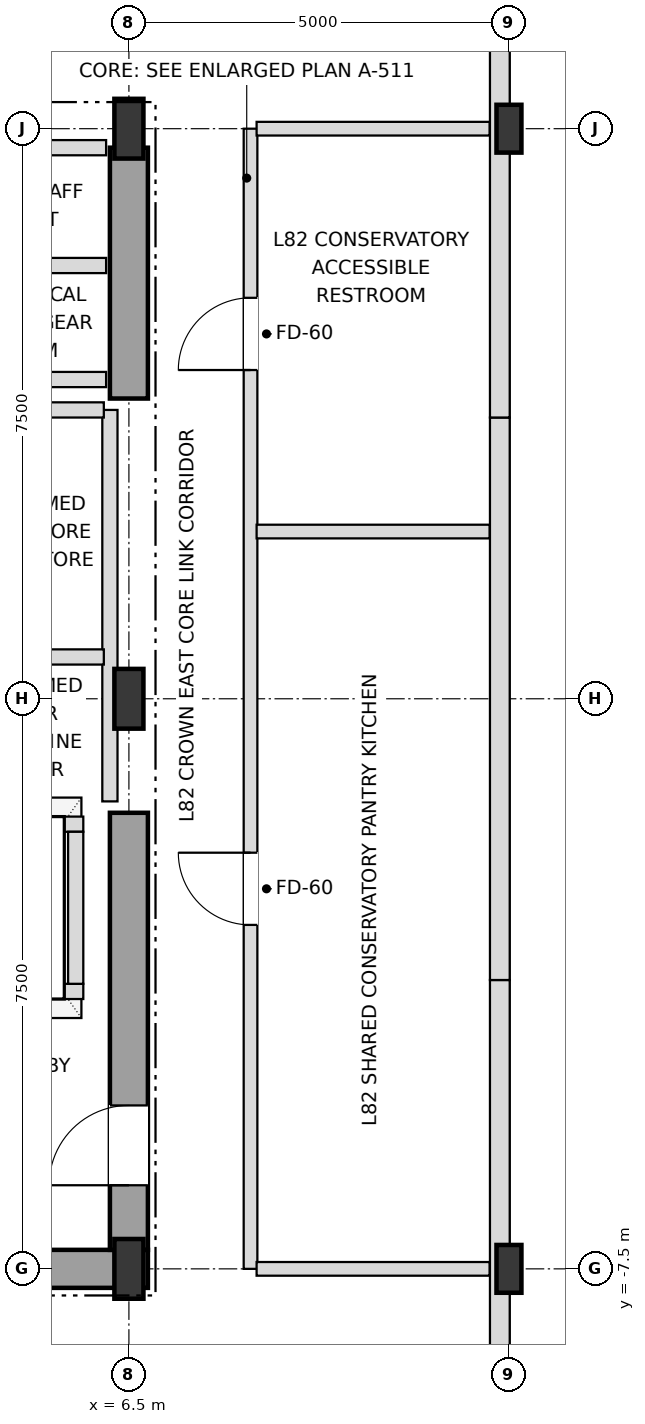
"""IFC4 building model, lengths in metres.
Left out: names, types, materials, properties, quantities, classifications, styles, units other than length and angle.
Written with IfcOpenShell. Run it as: python <this file> out.ifc"""

import sys

from ifc_helpers import new_model, si_unit, direction, frame, frame_2d, origin, origin_2d, place, context, subcontext, project, spatial, rectangle, i_section, extrude, element, fill, save


model = new_model("IFC4")
c1 = context("Model", 3, precision=1e-05, world=origin(), true_north=direction((0.0, 1.0)))
c2 = subcontext(c1, "Body", "Model", "MODEL_VIEW")
j1 = project(units=[si_unit("LENGTHUNIT", "METRE"), si_unit("PLANEANGLEUNIT", "RADIAN")], contexts=[c1])
p1 = place(None, origin())
s1 = spatial("IfcSite", under=j1, at=p1, CompositionType="ELEMENT")
p2 = place(p1, origin())
s2 = spatial("IfcBuilding", under=s1, at=p2, CompositionType="ELEMENT")
p3 = place(p2, frame((0.0, 0.0, 314.4)))
s3 = spatial("IfcBuildingStorey", under=s2, at=p3, CompositionType="ELEMENT", Elevation=314.4)
for number, where, z_axis, x_axis in (
    (1, (6.5, -7.5, 0.0), (0.0, 0.0, 1.0), (1.0, 0.0, 0.0)),
    (2, (6.5, 0.0, 0.0), (0.0, 0.0, 1.0), (1.0, 0.0, 0.0)),
    (3, (6.5, 7.5, 0.0), (0.0, 0.0, 1.0), (1.0, 0.0, 0.0)),
):
    element("IfcColumn", number, at=place(p3, frame(where, z_axis=z_axis, x_axis=x_axis)), inside=s3, PredefinedType="COLUMN", context=c2, shape_type="SweptSolid", body=[
        extrude(i_section(OverallWidth=0.382, OverallDepth=0.786, WebThickness=0.02, FlangeThickness=0.033, at=origin_2d()), origin(), (0.0, 0.0, 1.0), 4.5),
    ])
for number, where, z_axis, x_axis in (
    (4, (11.5, -7.5, 0.0), (0.0, 0.0, 1.0), (1.0, 0.0, 0.0)),
    (5, (11.5, 7.5, 0.0), (0.0, 0.0, 1.0), (1.0, 0.0, 0.0)),
):
    element("IfcColumn", number, at=place(p3, frame(where, z_axis=z_axis, x_axis=x_axis)), inside=s3, PredefinedType="COLUMN", context=c2, shape_type="SweptSolid", body=[
        extrude(i_section(OverallWidth=0.328, OverallDepth=0.629, WebThickness=0.014, FlangeThickness=0.021, at=origin_2d()), origin(), (0.0, 0.0, 1.0), 4.5),
    ])
p4 = place(p3, frame((11.38, -11.2, 0.0), z_axis=(0.0, 0.0, 1.0), x_axis=(0.0, 1.0, 0.0)))
e6 = element("IfcWall", 6, at=p4, inside=s3, PredefinedType="SOLIDWALL", context=c2, shape_type="SweptSolid", body=[
    extrude(rectangle(XDim=7.5, YDim=0.26, at=frame_2d((3.75, 0.0))), origin(), (0.0, 0.0, 1.0), 3.918),
])
p5 = place(p3, frame((11.38, -3.7, 0.0), z_axis=(0.0, 0.0, 1.0), x_axis=(0.0, 1.0, 0.0)))
e7 = element("IfcWall", 7, at=p5, inside=s3, PredefinedType="SOLIDWALL", context=c2, shape_type="SweptSolid", body=[
    extrude(rectangle(XDim=7.4, YDim=0.26, at=frame_2d((3.7, 0.0))), origin(), (0.0, 0.0, 1.0), 3.918),
])
p6 = place(p3, frame((11.38, 3.7, 0.0), z_axis=(0.0, 0.0, 1.0), x_axis=(0.0, 1.0, 0.0)))
e8 = element("IfcWall", 8, at=p6, inside=s3, PredefinedType="SOLIDWALL", context=c2, shape_type="SweptSolid", body=[
    extrude(rectangle(XDim=7.5, YDim=0.26, at=frame_2d((3.75, 0.0))), origin(), (0.0, 0.0, 1.0), 3.918),
])
p7 = place(p3, frame((0.0, -7.5, 0.0), z_axis=(0.0, 0.0, 1.0), x_axis=(1.0, 0.0, 0.0)))
e9 = element("IfcWall", 9, at=p7, inside=s3, PredefinedType="SHEAR", context=c2, shape_type="SweptSolid", body=[
    extrude(rectangle(XDim=6.75, YDim=0.5, at=frame_2d((3.375, 0.0))), origin(), (0.0, 0.0, 1.0), 4.25),
])
p8 = place(p3, frame((6.5, -7.25, 0.0), z_axis=(0.0, 0.0, 1.0), x_axis=(0.0, 1.0, 0.0)))
e10 = element("IfcWall", 10, at=p8, inside=s3, PredefinedType="SHEAR", context=c2, shape_type="SweptSolid", body=[
    extrude(rectangle(XDim=5.75, YDim=0.5, at=frame_2d((2.875, 0.0))), origin(), (0.0, 0.0, 1.0), 4.25),
])
p9 = place(p8, frame((0.85, 0.0, 0.0)))
e11 = element("IfcOpeningElement", 11, at=p9, cuts=e10, PredefinedType="OPENING", context=c2, shape_type="SweptSolid", body=[
    extrude(rectangle(XDim=1.05, YDim=2.15, at=frame_2d((0.525, 1.075))), frame((0.0, 0.26, 0.0), z_axis=(0.0, -1.0, 0.0), x_axis=(1.0, 0.0, 0.0)), (0.0, 0.0, 1.0), 0.52),
])
p10 = place(p3, frame((6.5, 3.95, 0.0), z_axis=(0.0, 0.0, 1.0), x_axis=(0.0, 1.0, 0.0)))
e12 = element("IfcWall", 12, at=p10, inside=s3, PredefinedType="SHEAR", context=c2, shape_type="SweptSolid", body=[
    extrude(rectangle(XDim=3.3, YDim=0.5, at=frame_2d((1.65, 0.0))), origin(), (0.0, 0.0, 1.0), 4.25),
])
p11 = place(p3, frame((1.8, -3.85, 0.0), z_axis=(0.0, 0.0, 1.0), x_axis=(1.0, 0.0, 0.0)))
e13 = element("IfcWall", 13, at=p11, inside=s3, PredefinedType="SOLIDWALL", context=c2, shape_type="SweptSolid", body=[
    extrude(rectangle(XDim=4.1, YDim=0.2, at=frame_2d((2.05, 0.0))), origin(), (0.0, 0.0, 1.0), 4.25),
])
p12 = place(p11, frame((0.45, 0.0, 0.0)))
e14 = element("IfcOpeningElement", 14, at=p12, cuts=e13, PredefinedType="OPENING", context=c2, shape_type="SweptSolid", body=[
    extrude(rectangle(XDim=1.2, YDim=2.2, at=frame_2d((0.6, 1.1))), frame((0.0, 0.11, 0.0), z_axis=(0.0, -1.0, 0.0), x_axis=(1.0, 0.0, 0.0)), (0.0, 0.0, 1.0), 0.22),
])
p13 = place(p11, frame((2.45, 0.0, 0.0)))
e15 = element("IfcOpeningElement", 15, at=p13, cuts=e13, PredefinedType="OPENING", context=c2, shape_type="SweptSolid", body=[
    extrude(rectangle(XDim=1.2, YDim=2.2, at=frame_2d((0.6, 1.1))), frame((0.0, 0.11, 0.0), z_axis=(0.0, -1.0, 0.0), x_axis=(1.0, 0.0, 0.0)), (0.0, 0.0, 1.0), 0.22),
])
p14 = place(p3, frame((1.8, -1.65, 0.0), z_axis=(0.0, 0.0, 1.0), x_axis=(1.0, 0.0, 0.0)))
e16 = element("IfcWall", 16, at=p14, inside=s3, PredefinedType="SOLIDWALL", context=c2, shape_type="SweptSolid", body=[
    extrude(rectangle(XDim=4.1, YDim=0.2, at=frame_2d((2.05, 0.0))), origin(), (0.0, 0.0, 1.0), 4.25),
])
p15 = place(p3, frame((5.8, -3.75, 0.0), z_axis=(0.0, 0.0, 1.0), x_axis=(0.0, 1.0, 0.0)))
e17 = element("IfcWall", 17, at=p15, inside=s3, PredefinedType="SOLIDWALL", context=c2, shape_type="SweptSolid", body=[
    extrude(rectangle(XDim=2.0, YDim=0.2, at=frame_2d((1.0, 0.0))), origin(), (0.0, 0.0, 1.0), 4.25),
])
p16 = place(p3, frame((6.25, -1.35, 0.0), z_axis=(0.0, 0.0, 1.0), x_axis=(0.0, 1.0, 0.0)))
e18 = element("IfcWall", 18, at=p16, inside=s3, PredefinedType="SOLIDWALL", context=c2, shape_type="SweptSolid", body=[
    extrude(rectangle(XDim=5.15, YDim=0.2, at=frame_2d((2.575, 0.0))), origin(), (0.0, 0.0, 1.0), 4.25),
])
p17 = place(p3, frame((8.1, -7.5, 0.0), z_axis=(0.0, 0.0, 1.0), x_axis=(0.0, 1.0, 0.0)))
e19 = element("IfcWall", 19, at=p17, inside=s3, PredefinedType="PARTITIONING", context=c2, shape_type="SweptSolid", body=[
    extrude(rectangle(XDim=15.0, YDim=0.18, at=frame_2d((7.5, 0.0))), origin(), (0.0, 0.0, 1.0), 4.25),
])
p18 = place(p17, frame((4.525, 0.0, 0.0)))
e20 = element("IfcOpeningElement", 20, at=p18, cuts=e19, PredefinedType="OPENING", context=c2, shape_type="SweptSolid", body=[
    extrude(rectangle(XDim=0.95, YDim=2.15, at=frame_2d((0.475, 1.075))), frame((0.0, 0.1, 0.0), z_axis=(0.0, -1.0, 0.0), x_axis=(1.0, 0.0, 0.0)), (0.0, 0.0, 1.0), 0.2),
])
p19 = place(p17, frame((11.825, 0.0, 0.0)))
e21 = element("IfcOpeningElement", 21, at=p19, cuts=e19, PredefinedType="OPENING", context=c2, shape_type="SweptSolid", body=[
    extrude(rectangle(XDim=0.95, YDim=2.15, at=frame_2d((0.475, 1.075))), frame((0.0, 0.1, 0.0), z_axis=(0.0, -1.0, 0.0), x_axis=(1.0, 0.0, 0.0)), (0.0, 0.0, 1.0), 0.2),
])
p20 = place(p3, frame((8.18, -7.5, 0.0), z_axis=(0.0, 0.0, 1.0), x_axis=(1.0, 0.0, 0.0)))
e22 = element("IfcWall", 22, at=p20, inside=s3, PredefinedType="PARTITIONING", context=c2, shape_type="SweptSolid", body=[
    extrude(rectangle(XDim=3.065, YDim=0.18, at=frame_2d((1.533, 0.0))), origin(), (0.0, 0.0, 1.0), 3.918),
])
p21 = place(p3, frame((4.13, 0.55, 0.0), z_axis=(0.0, 0.0, 1.0), x_axis=(1.0, 0.0, 0.0)))
e23 = element("IfcWall", 23, at=p21, inside=s3, PredefinedType="SOLIDWALL", context=c2, shape_type="SweptSolid", body=[
    extrude(rectangle(XDim=2.04, YDim=0.2, at=frame_2d((1.02, 0.0))), origin(), (0.0, 0.0, 1.0), 4.25),
])
p22 = place(p3, frame((8.18, 2.2, 0.0), z_axis=(0.0, 0.0, 1.0), x_axis=(1.0, 0.0, 0.0)))
e24 = element("IfcWall", 24, at=p22, inside=s3, PredefinedType="PARTITIONING", context=c2, shape_type="SweptSolid", body=[
    extrude(rectangle(XDim=3.065, YDim=0.18, at=frame_2d((1.533, 0.0))), origin(), (0.0, 0.0, 1.0), 4.25),
])
p23 = place(p3, frame((4.13, 3.8, 0.0), z_axis=(0.0, 0.0, 1.0), x_axis=(1.0, 0.0, 0.0)))
e25 = element("IfcWall", 25, at=p23, inside=s3, PredefinedType="SOLIDWALL", context=c2, shape_type="SweptSolid", body=[
    extrude(rectangle(XDim=2.04, YDim=0.2, at=frame_2d((1.02, 0.0))), origin(), (0.0, 0.0, 1.0), 4.25),
])
for number, where, z_axis, x_axis in (
    (26, (4.13, 4.2, 0.0), (0.0, 0.0, 1.0), (1.0, 0.0, 0.0)),
    (27, (4.13, 5.7, 0.0), (0.0, 0.0, 1.0), (1.0, 0.0, 0.0)),
    (28, (4.13, 7.25, 0.0), (0.0, 0.0, 1.0), (1.0, 0.0, 0.0)),
):
    element("IfcWall", number, at=place(p3, frame(where, z_axis=z_axis, x_axis=x_axis)), inside=s3, PredefinedType="SOLIDWALL", context=c2, shape_type="SweptSolid", body=[
        extrude(rectangle(XDim=2.07, YDim=0.2, at=frame_2d((1.035, 0.0))), origin(), (0.0, 0.0, 1.0), 4.25),
    ])
p24 = place(p3, frame((8.18, 7.5, 0.0), z_axis=(0.0, 0.0, 1.0), x_axis=(1.0, 0.0, 0.0)))
e29 = element("IfcWall", 29, at=p24, inside=s3, PredefinedType="PARTITIONING", context=c2, shape_type="SweptSolid", body=[
    extrude(rectangle(XDim=3.065, YDim=0.18, at=frame_2d((1.533, 0.0))), origin(), (0.0, 0.0, 1.0), 3.918),
])
p25 = place(p9, origin())
e30 = element("IfcDoor", 30, at=p25, inside=s3, OperationType="SINGLE_SWING_LEFT", PredefinedType="DOOR", context=c2, shape_type="SweptSolid", body=[
    extrude(rectangle(XDim=1.05, YDim=2.15, at=frame_2d((0.525, 1.075))), frame((0.0, 0.025, 0.0), z_axis=(0.0, -1.0, 0.0), x_axis=(1.0, 0.0, 0.0)), (0.0, 0.0, 1.0), 0.05),
])
fill(e11, e30)
p26 = place(p18, origin())
e31 = element("IfcDoor", 31, at=p26, inside=s3, OperationType="SINGLE_SWING_RIGHT", PredefinedType="DOOR", context=c2, shape_type="SweptSolid", body=[
    extrude(rectangle(XDim=0.95, YDim=2.15, at=frame_2d((0.475, 1.075))), frame((0.0, 0.025, 0.0), z_axis=(0.0, -1.0, 0.0), x_axis=(1.0, 0.0, 0.0)), (0.0, 0.0, 1.0), 0.05),
])
fill(e20, e31)
p27 = place(p19, origin())
e32 = element("IfcDoor", 32, at=p27, inside=s3, OperationType="SINGLE_SWING_LEFT", PredefinedType="DOOR", context=c2, shape_type="SweptSolid", body=[
    extrude(rectangle(XDim=0.95, YDim=2.15, at=frame_2d((0.475, 1.075))), frame((0.0, 0.025, 0.0), z_axis=(0.0, -1.0, 0.0), x_axis=(1.0, 0.0, 0.0)), (0.0, 0.0, 1.0), 0.05),
])
fill(e21, e32)
save(model, sys.argv[1])
